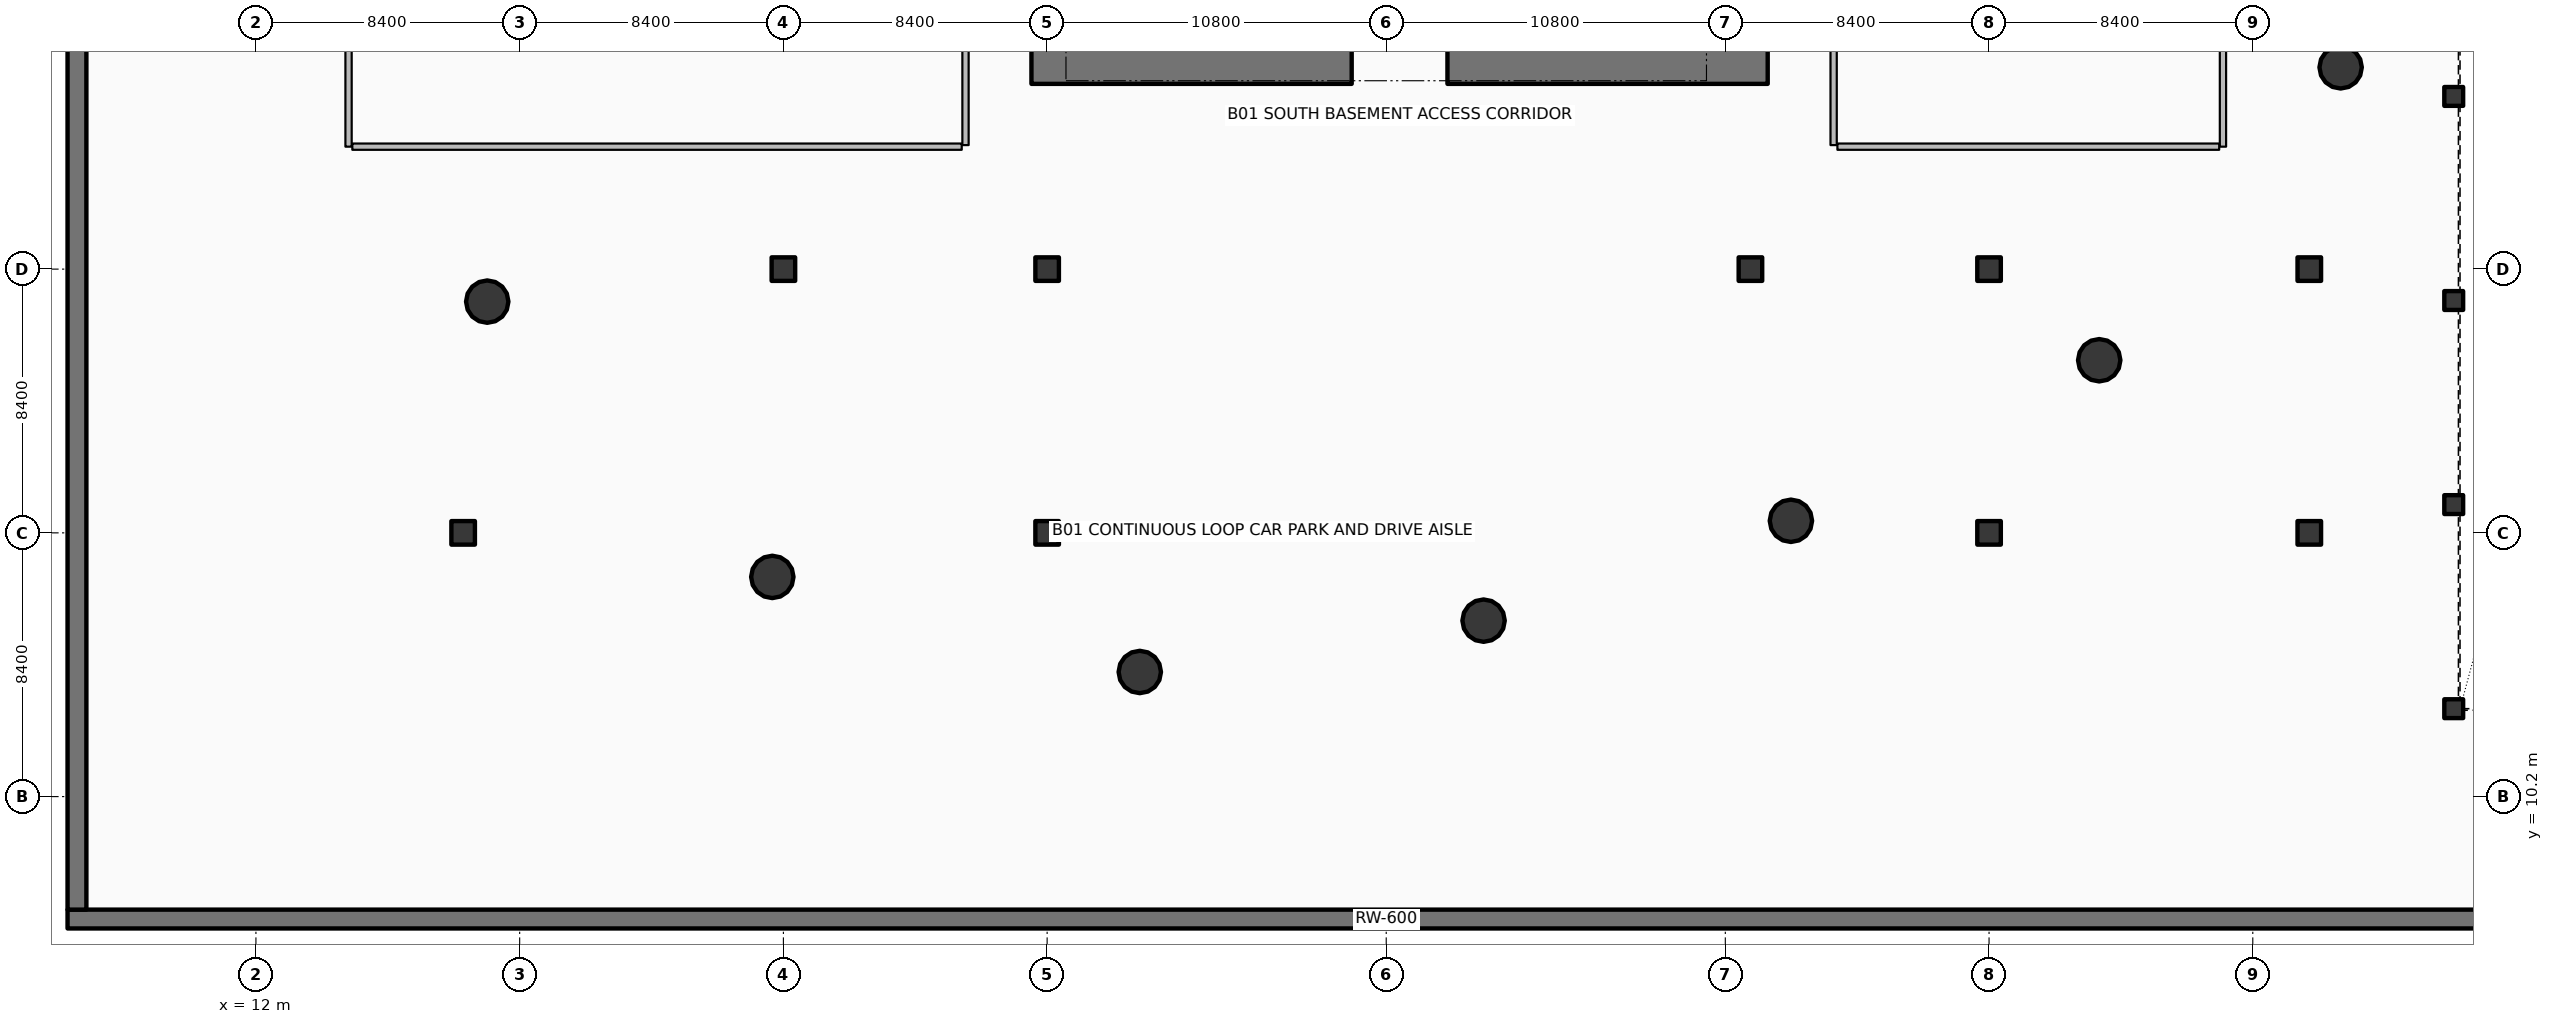
"""IFC4 building model, lengths in metres.
Left out: names, types, materials, properties, quantities, classifications, styles, units other than length and angle.
Written with IfcOpenShell. Run it as: python <this file> out.ifc"""

import sys

from ifc_helpers import new_model, si_unit, direction, frame, frame_2d, origin, origin_2d, place, context, subcontext, project, spatial, rectangle, circle, extrude, element, save


model = new_model("IFC4")
c1 = context("Model", 3, precision=1e-05, world=origin(), true_north=direction((0.0, 1.0)))
c2 = subcontext(c1, "Body", "Model", "MODEL_VIEW")
j1 = project(units=[si_unit("LENGTHUNIT", "METRE"), si_unit("PLANEANGLEUNIT", "RADIAN")], contexts=[c1])
p1 = place(None, origin())
s1 = spatial("IfcSite", under=j1, at=p1, CompositionType="ELEMENT")
p2 = place(p1, origin())
s2 = spatial("IfcBuilding", under=s1, at=p2, CompositionType="ELEMENT")
p3 = place(p2, frame((0.0, 0.0, -3.8)))
s3 = spatial("IfcBuildingStorey", under=s2, at=p3, CompositionType="ELEMENT", Elevation=-3.8)
p4 = place(p3, frame((6.0, 6.3, 0.0), z_axis=(0.0, 0.0, 1.0), x_axis=(1.0, 0.0, 0.0)))
e1 = element("IfcWall", 1, at=p4, inside=s3, PredefinedType="USERDEFINED", context=c2, shape_type="SweptSolid", body=[
    extrude(rectangle(XDim=84.0, YDim=0.6, at=frame_2d((42.0, 0.0))), origin(), (0.0, 0.0, 1.0), 3.8),
])
p5 = place(p3, frame((6.3, 6.6, 0.0), z_axis=(0.0, 0.0, 1.0), x_axis=(0.0, 1.0, 0.0)))
e2 = element("IfcWall", 2, at=p5, inside=s3, PredefinedType="USERDEFINED", context=c2, shape_type="SweptSolid", body=[
    extrude(rectangle(XDim=70.8, YDim=0.6, at=frame_2d((35.4, 0.0))), origin(), (0.0, 0.0, 1.0), 3.8),
])
for number, where, z_axis, x_axis in (
    (3, (18.6, 18.6, 0.0), (0.0, 0.0, 1.0), (1.0, 0.0, 0.0)),
    (4, (28.8, 27.0, 0.0), (0.0, 0.0, 1.0), (1.0, 0.0, 0.0)),
    (5, (37.2, 18.6, 0.0), (0.0, 0.0, 1.0), (1.0, 0.0, 0.0)),
    (6, (37.2, 27.0, 0.0), (0.0, 0.0, 1.0), (1.0, 0.0, 0.0)),
    (7, (59.6, 27.0, 0.0), (0.0, 0.0, 1.0), (1.0, 0.0, 0.0)),
    (8, (67.2, 18.6, 0.0), (0.0, 0.0, 1.0), (1.0, 0.0, 0.0)),
    (9, (67.2, 27.0, 0.0), (0.0, 0.0, 1.0), (1.0, 0.0, 0.0)),
    (10, (77.4, 18.6, 0.0), (0.0, 0.0, 1.0), (1.0, 0.0, 0.0)),
    (11, (77.4, 27.0, 0.0), (0.0, 0.0, 1.0), (1.0, 0.0, 0.0)),
):
    element("IfcColumn", number, at=place(p3, frame(where, z_axis=z_axis, x_axis=x_axis)), inside=s3, PredefinedType="COLUMN", context=c2, shape_type="SweptSolid", body=[
        extrude(rectangle(XDim=0.75, YDim=0.75, at=origin_2d()), origin(), (0.0, 0.0, 1.0), 3.48),
    ])
for number, where, z_axis, x_axis in (
    (12, (82.0, 13.0, 0.0), (0.0, 0.0, 1.0), (1.0, 0.0, 0.0)),
    (13, (82.0, 19.5, 0.0), (0.0, 0.0, 1.0), (1.0, 0.0, 0.0)),
    (14, (82.0, 26.0, 0.0), (0.0, 0.0, 1.0), (1.0, 0.0, 0.0)),
    (15, (82.0, 32.5, 0.0), (0.0, 0.0, 1.0), (1.0, 0.0, 0.0)),
):
    element("IfcColumn", number, at=place(p3, frame(where, z_axis=z_axis, x_axis=x_axis)), inside=s3, PredefinedType="COLUMN", context=c2, shape_type="SweptSolid", body=[
        extrude(rectangle(XDim=0.6, YDim=0.6, at=origin_2d()), origin(), (0.0, 0.0, 1.0), 3.48),
    ])
for number, where, z_axis, x_axis in (
    (16, (36.7, 33.45, 0.0), (0.0, 0.0, 1.0), (1.0, 0.0, 0.0)),
    (17, (49.95, 33.45, 0.0), (0.0, 0.0, 1.0), (1.0, 0.0, 0.0)),
):
    element("IfcWall", number, at=place(p3, frame(where, z_axis=z_axis, x_axis=x_axis)), inside=s3, PredefinedType="SHEAR", context=c2, shape_type="SweptSolid", body=[
        extrude(rectangle(XDim=10.2, YDim=1.1, at=frame_2d((5.1, 0.0))), origin(), (0.0, 0.0, 1.0), 3.8),
    ])
for number, where, z_axis, x_axis in (
    (18, (19.367, 25.965, 0.0), (0.0, 0.0, 1.0), (1.0, 0.0, 0.0)),
    (19, (28.447, 17.197, 0.0), (0.0, 0.0, 1.0), (1.0, 0.0, 0.0)),
    (20, (40.151, 14.169, 0.0), (0.0, 0.0, 1.0), (1.0, 0.0, 0.0)),
    (21, (51.101, 15.804, 0.0), (0.0, 0.0, 1.0), (1.0, 0.0, 0.0)),
    (22, (60.889, 18.984, 0.0), (0.0, 0.0, 1.0), (1.0, 0.0, 0.0)),
    (23, (70.709, 24.098, 0.0), (0.0, 0.0, 1.0), (1.0, 0.0, 0.0)),
    (24, (78.398, 33.427, 0.0), (0.0, 0.0, 1.0), (1.0, 0.0, 0.0)),
):
    element("IfcColumn", number, at=place(p3, frame(where, z_axis=z_axis, x_axis=x_axis)), inside=s3, PredefinedType="COLUMN", context=c2, shape_type="SweptSolid", body=[
        extrude(circle(Radius=0.675, at=origin_2d()), origin(), (0.0, 0.0, 1.0), 3.48),
    ])
p6 = place(p3, frame((14.95, 30.9, 0.0), z_axis=(0.0, 0.0, 1.0), x_axis=(0.0, 1.0, 0.0)))
e25 = element("IfcWall", 25, at=p6, inside=s3, PredefinedType="PARTITIONING", context=c2, shape_type="SweptSolid", body=[
    extrude(rectangle(XDim=22.2, YDim=0.2, at=frame_2d((11.1, 0.0))), origin(), (0.0, 0.0, 1.0), 2.92),
])
p7 = place(p3, frame((15.07, 30.9, 0.0), z_axis=(0.0, 0.0, 1.0), x_axis=(1.0, 0.0, 0.0)))
e26 = element("IfcWall", 26, at=p7, inside=s3, PredefinedType="PARTITIONING", context=c2, shape_type="SweptSolid", body=[
    extrude(rectangle(XDim=19.41, YDim=0.2, at=frame_2d((9.705, 0.0))), origin(), (0.0, 0.0, 1.0), 2.771),
])
p8 = place(p3, frame((34.6, 30.95, 0.0), z_axis=(0.0, 0.0, 1.0), x_axis=(0.0, 1.0, 0.0)))
e27 = element("IfcWall", 27, at=p8, inside=s3, PredefinedType="PARTITIONING", context=c2, shape_type="SweptSolid", body=[
    extrude(rectangle(XDim=22.1, YDim=0.2, at=frame_2d((11.05, 0.0))), origin(), (0.0, 0.0, 1.0), 2.771),
])
p9 = place(p8, frame((10.525, 0.0, 0.0)))
e28 = element("IfcOpeningElement", 28, at=p9, cuts=e27, PredefinedType="OPENING", context=c2, shape_type="SweptSolid", body=[
    extrude(rectangle(XDim=1.05, YDim=2.1, at=frame_2d((0.525, 1.05))), frame((0.0, 0.11, 0.0), z_axis=(0.0, -1.0, 0.0), x_axis=(1.0, 0.0, 0.0)), (0.0, 0.0, 1.0), 0.22),
])
p10 = place(p3, frame((74.65, 30.9, 0.0), z_axis=(0.0, 0.0, 1.0), x_axis=(0.0, 1.0, 0.0)))
e29 = element("IfcWall", 29, at=p10, inside=s3, PredefinedType="PARTITIONING", context=c2, shape_type="SweptSolid", body=[
    extrude(rectangle(XDim=22.2, YDim=0.2, at=frame_2d((11.1, 0.0))), origin(), (0.0, 0.0, 1.0), 2.771),
])
p11 = place(p3, frame((62.37, 30.9, 0.0), z_axis=(0.0, 0.0, 1.0), x_axis=(1.0, 0.0, 0.0)))
e30 = element("IfcWall", 30, at=p11, inside=s3, PredefinedType="PARTITIONING", context=c2, shape_type="SweptSolid", body=[
    extrude(rectangle(XDim=12.16, YDim=0.2, at=frame_2d((6.08, 0.0))), origin(), (0.0, 0.0, 1.0), 2.771),
])
p12 = place(p3, frame((62.25, 30.95, 0.0), z_axis=(0.0, 0.0, 1.0), x_axis=(0.0, 1.0, 0.0)))
e31 = element("IfcWall", 31, at=p12, inside=s3, PredefinedType="PARTITIONING", context=c2, shape_type="SweptSolid", body=[
    extrude(rectangle(XDim=22.1, YDim=0.2, at=frame_2d((11.05, 0.0))), origin(), (0.0, 0.0, 1.0), 2.771),
])
p13 = place(p12, frame((10.525, 0.0, 0.0)))
e32 = element("IfcOpeningElement", 32, at=p13, cuts=e31, PredefinedType="OPENING", context=c2, shape_type="SweptSolid", body=[
    extrude(rectangle(XDim=1.05, YDim=2.1, at=frame_2d((0.525, 1.05))), frame((0.0, 0.11, 0.0), z_axis=(0.0, -1.0, 0.0), x_axis=(1.0, 0.0, 0.0)), (0.0, 0.0, 1.0), 0.22),
])
save(model, sys.argv[1])
